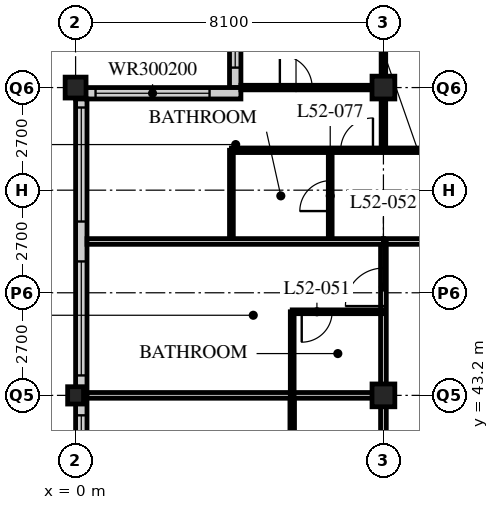
"""IFC4 building model, lengths in metres.
Left out: names, types, materials, properties, quantities, classifications, styles, units other than length and angle.
Written with IfcOpenShell. Run it as: python <this file> out.ifc"""

import sys

from ifc_helpers import new_model, si_unit, direction, frame, frame_2d, origin, origin_2d, place, context, subcontext, project, spatial, rectangle, hollow_rectangle, i_section, extrude, element, fill, save


model = new_model("IFC4")
c1 = context("Model", 3, precision=1e-05, world=origin(), true_north=direction((0.0, 1.0)))
c2 = subcontext(c1, "Body", "Model", "MODEL_VIEW")
j1 = project(units=[si_unit("LENGTHUNIT", "METRE"), si_unit("PLANEANGLEUNIT", "RADIAN")], contexts=[c1])
p1 = place(None, origin())
s1 = spatial("IfcSite", under=j1, at=p1, CompositionType="ELEMENT")
p2 = place(p1, origin())
s2 = spatial("IfcBuilding", under=s1, at=p2, CompositionType="ELEMENT")
p3 = place(p2, frame((0.0, 0.0, 202.8)))
s3 = spatial("IfcBuildingStorey", under=s2, at=p3, CompositionType="ELEMENT", Elevation=202.8)
p4 = place(p3, frame((0.0, 43.2, 0.0), z_axis=(0.0, 0.0, 1.0), x_axis=(1.0, 0.0, 0.0)))
e1 = element("IfcColumn", 1, at=p4, inside=s3, PredefinedType="COLUMN", context=c2, shape_type="SweptSolid", body=[
    extrude(i_section(OverallWidth=0.418, OverallDepth=0.456, WebThickness=0.042, FlangeThickness=0.067, FilletRadius=0.015, at=origin_2d()), origin(), (0.0, 0.0, 1.0), 3.6),
])
p5 = place(p3, frame((0.0, 51.3, 0.0), z_axis=(0.0, 0.0, 1.0), x_axis=(1.0, 0.0, 0.0)))
e2 = element("IfcColumn", 2, at=p5, inside=s3, PredefinedType="COLUMN", context=c2, shape_type="SweptSolid", body=[
    extrude(hollow_rectangle(XDim=0.55, YDim=0.55, WallThickness=0.045, at=origin_2d()), origin(), (0.0, 0.0, 1.0), 3.6),
])
for number, where, z_axis, x_axis in (
    (3, (8.1, 43.2, 0.0), (0.0, 0.0, 1.0), (1.0, 0.0, 0.0)),
    (4, (8.1, 51.3, 0.0), (0.0, 0.0, 1.0), (1.0, 0.0, 0.0)),
):
    element("IfcColumn", number, at=place(p3, frame(where, z_axis=z_axis, x_axis=x_axis)), inside=s3, PredefinedType="COLUMN", context=c2, shape_type="SweptSolid", body=[
        extrude(hollow_rectangle(XDim=0.6, YDim=0.6, WallThickness=0.05, at=origin_2d()), origin(), (0.0, 0.0, 1.0), 3.6),
    ])
p6 = place(p3, frame((4.2, 55.05, 0.0), z_axis=(0.0, 0.0, 1.0), x_axis=(0.0, -1.0, 0.0)))
e5 = element("IfcWall", 5, at=p6, inside=s3, PredefinedType="SOLIDWALL", context=c2, shape_type="SweptSolid", body=[
    extrude(rectangle(XDim=3.75, YDim=0.3, at=frame_2d((1.875, 0.0))), origin(), (0.0, 0.0, 1.0), 3.39),
])
p7 = place(p6, frame((0.225, 0.0, 0.6)))
e6 = element("IfcOpeningElement", 6, at=p7, cuts=e5, PredefinedType="OPENING", context=c2, shape_type="SweptSolid", body=[
    extrude(rectangle(XDim=3.0, YDim=2.0, at=frame_2d((1.5, 1.0))), frame((0.0, 0.16, 0.0), z_axis=(0.0, -1.0, 0.0), x_axis=(1.0, 0.0, 0.0)), (0.0, 0.0, 1.0), 0.32),
])
p8 = place(p3, frame((4.35, 51.15, 0.0), z_axis=(0.0, 0.0, 1.0), x_axis=(-1.0, 0.0, 0.0)))
e7 = element("IfcWall", 7, at=p8, inside=s3, PredefinedType="SOLIDWALL", context=c2, shape_type="SweptSolid", body=[
    extrude(rectangle(XDim=4.35, YDim=0.3, at=frame_2d((2.175, 0.0))), origin(), (0.0, 0.0, 1.0), 3.39),
])
p9 = place(p8, frame((0.825, 0.0, 0.6)))
e8 = element("IfcOpeningElement", 8, at=p9, cuts=e7, PredefinedType="OPENING", context=c2, shape_type="SweptSolid", body=[
    extrude(rectangle(XDim=3.0, YDim=2.0, at=frame_2d((1.5, 1.0))), frame((0.0, 0.16, 0.0), z_axis=(0.0, -1.0, 0.0), x_axis=(1.0, 0.0, 0.0)), (0.0, 0.0, 1.0), 0.32),
])
p10 = place(p3, frame((0.15, 51.0, 0.0), z_axis=(0.0, 0.0, 1.0), x_axis=(0.0, -1.0, 0.0)))
e9 = element("IfcWall", 9, at=p10, inside=s3, PredefinedType="SOLIDWALL", context=c2, shape_type="SweptSolid", body=[
    extrude(rectangle(XDim=32.1, YDim=0.3, at=frame_2d((16.05, 0.0))), origin(), (0.0, 0.0, 1.0), 3.39),
])
p11 = place(p10, frame((0.225, 0.0, 0.6)))
e10 = element("IfcOpeningElement", 10, at=p11, cuts=e9, PredefinedType="OPENING", context=c2, shape_type="SweptSolid", body=[
    extrude(rectangle(XDim=3.0, YDim=2.4, at=frame_2d((1.5, 1.2))), frame((0.0, 0.16, 0.0), z_axis=(0.0, -1.0, 0.0), x_axis=(1.0, 0.0, 0.0)), (0.0, 0.0, 1.0), 0.32),
])
p12 = place(p10, frame((4.275, 0.0, 0.6)))
e11 = element("IfcOpeningElement", 11, at=p12, cuts=e9, PredefinedType="OPENING", context=c2, shape_type="SweptSolid", body=[
    extrude(rectangle(XDim=3.0, YDim=2.4, at=frame_2d((1.5, 1.2))), frame((0.0, 0.16, 0.0), z_axis=(0.0, -1.0, 0.0), x_axis=(1.0, 0.0, 0.0)), (0.0, 0.0, 1.0), 0.32),
])
p13 = place(p10, frame((8.325, 0.0, 0.6)))
e12 = element("IfcOpeningElement", 12, at=p13, cuts=e9, PredefinedType="OPENING", context=c2, shape_type="SweptSolid", body=[
    extrude(rectangle(XDim=3.0, YDim=2.4, at=frame_2d((1.5, 1.2))), frame((0.0, 0.16, 0.0), z_axis=(0.0, -1.0, 0.0), x_axis=(1.0, 0.0, 0.0)), (0.0, 0.0, 1.0), 0.32),
])
p14 = place(p10, frame((12.375, 0.0, 0.6)))
e13 = element("IfcOpeningElement", 13, at=p14, cuts=e9, PredefinedType="OPENING", context=c2, shape_type="SweptSolid", body=[
    extrude(rectangle(XDim=3.0, YDim=2.4, at=frame_2d((1.5, 1.2))), frame((0.0, 0.16, 0.0), z_axis=(0.0, -1.0, 0.0), x_axis=(1.0, 0.0, 0.0)), (0.0, 0.0, 1.0), 0.32),
])
p15 = place(p10, frame((16.425, 0.0, 0.6)))
e14 = element("IfcOpeningElement", 14, at=p15, cuts=e9, PredefinedType="OPENING", context=c2, shape_type="SweptSolid", body=[
    extrude(rectangle(XDim=3.0, YDim=2.4, at=frame_2d((1.5, 1.2))), frame((0.0, 0.16, 0.0), z_axis=(0.0, -1.0, 0.0), x_axis=(1.0, 0.0, 0.0)), (0.0, 0.0, 1.0), 0.32),
])
p16 = place(p10, frame((20.475, 0.0, 0.6)))
e15 = element("IfcOpeningElement", 15, at=p16, cuts=e9, PredefinedType="OPENING", context=c2, shape_type="SweptSolid", body=[
    extrude(rectangle(XDim=3.0, YDim=2.4, at=frame_2d((1.5, 1.2))), frame((0.0, 0.16, 0.0), z_axis=(0.0, -1.0, 0.0), x_axis=(1.0, 0.0, 0.0)), (0.0, 0.0, 1.0), 0.32),
])
p17 = place(p10, frame((24.525, 0.0, 0.6)))
e16 = element("IfcOpeningElement", 16, at=p17, cuts=e9, PredefinedType="OPENING", context=c2, shape_type="SweptSolid", body=[
    extrude(rectangle(XDim=3.0, YDim=2.4, at=frame_2d((1.5, 1.2))), frame((0.0, 0.16, 0.0), z_axis=(0.0, -1.0, 0.0), x_axis=(1.0, 0.0, 0.0)), (0.0, 0.0, 1.0), 0.32),
])
p18 = place(p10, frame((28.575, 0.0, 0.6)))
e17 = element("IfcOpeningElement", 17, at=p18, cuts=e9, PredefinedType="OPENING", context=c2, shape_type="SweptSolid", body=[
    extrude(rectangle(XDim=3.0, YDim=2.4, at=frame_2d((1.5, 1.2))), frame((0.0, 0.16, 0.0), z_axis=(0.0, -1.0, 0.0), x_axis=(1.0, 0.0, 0.0)), (0.0, 0.0, 1.0), 0.32),
])
p19 = place(p3, frame((8.1, 47.25, 0.0), z_axis=(0.0, 0.0, 1.0), x_axis=(1.0, 0.0, 0.0)))
e18 = element("IfcWall", 18, at=p19, inside=s3, PredefinedType="PARTITIONING", context=c2, shape_type="SweptSolid", body=[
    extrude(rectangle(XDim=36.45, YDim=0.15, at=frame_2d((18.225, 0.0))), origin(), (0.0, 0.0, 1.0), 3.39),
])
p20 = place(p19, frame((4.45, 0.0, 0.0)))
e19 = element("IfcOpeningElement", 19, at=p20, cuts=e18, PredefinedType="OPENING", context=c2, shape_type="SweptSolid", body=[
    extrude(rectangle(XDim=1.0, YDim=2.1, at=frame_2d((0.5, 1.05))), frame((0.0, 0.085, 0.0), z_axis=(0.0, -1.0, 0.0), x_axis=(1.0, 0.0, 0.0)), (0.0, 0.0, 1.0), 0.17),
])
p21 = place(p19, frame((12.55, 0.0, 0.0)))
e20 = element("IfcOpeningElement", 20, at=p21, cuts=e18, PredefinedType="OPENING", context=c2, shape_type="SweptSolid", body=[
    extrude(rectangle(XDim=1.0, YDim=2.1, at=frame_2d((0.5, 1.05))), frame((0.0, 0.085, 0.0), z_axis=(0.0, -1.0, 0.0), x_axis=(1.0, 0.0, 0.0)), (0.0, 0.0, 1.0), 0.17),
])
p22 = place(p19, frame((30.7, 0.0, 0.0)))
e21 = element("IfcOpeningElement", 21, at=p22, cuts=e18, PredefinedType="OPENING", context=c2, shape_type="SweptSolid", body=[
    extrude(rectangle(XDim=1.0, YDim=2.1, at=frame_2d((0.5, 1.05))), frame((0.0, 0.085, 0.0), z_axis=(0.0, -1.0, 0.0), x_axis=(1.0, 0.0, 0.0)), (0.0, 0.0, 1.0), 0.17),
])
p23 = place(p19, frame((33.925, 0.0, 0.0)))
e22 = element("IfcOpeningElement", 22, at=p23, cuts=e18, PredefinedType="OPENING", context=c2, shape_type="SweptSolid", body=[
    extrude(rectangle(XDim=1.0, YDim=2.1, at=frame_2d((0.5, 1.05))), frame((0.0, 0.085, 0.0), z_axis=(0.0, -1.0, 0.0), x_axis=(1.0, 0.0, 0.0)), (0.0, 0.0, 1.0), 0.17),
])
p24 = place(p19, frame((1.525, 0.0, 0.0)))
e23 = element("IfcOpeningElement", 23, at=p24, cuts=e18, PredefinedType="OPENING", context=c2, shape_type="SweptSolid", body=[
    extrude(rectangle(XDim=1.0, YDim=2.1, at=frame_2d((0.5, 1.05))), frame((0.0, 0.085, 0.0), z_axis=(0.0, -1.0, 0.0), x_axis=(1.0, 0.0, 0.0)), (0.0, 0.0, 1.0), 0.17),
])
p25 = place(p3, frame((8.1, 18.9, 0.0), z_axis=(0.0, 0.0, 1.0), x_axis=(0.0, 1.0, 0.0)))
e24 = element("IfcWall", 24, at=p25, inside=s3, PredefinedType="PARTITIONING", context=c2, shape_type="SweptSolid", body=[
    extrude(rectangle(XDim=28.35, YDim=0.15, at=frame_2d((14.175, 0.0))), origin(), (0.0, 0.0, 1.0), 2.778),
])
p26 = place(p25, frame((0.9, 0.0, 0.0)))
e25 = element("IfcOpeningElement", 25, at=p26, cuts=e24, PredefinedType="OPENING", context=c2, shape_type="SweptSolid", body=[
    extrude(rectangle(XDim=1.0, YDim=2.1, at=frame_2d((0.5, 1.05))), frame((0.0, 0.085, 0.0), z_axis=(0.0, -1.0, 0.0), x_axis=(1.0, 0.0, 0.0)), (0.0, 0.0, 1.0), 0.17),
])
p27 = place(p25, frame((17.1, 0.0, 0.0)))
e26 = element("IfcOpeningElement", 26, at=p27, cuts=e24, PredefinedType="OPENING", context=c2, shape_type="SweptSolid", body=[
    extrude(rectangle(XDim=1.0, YDim=2.1, at=frame_2d((0.5, 1.05))), frame((0.0, 0.085, 0.0), z_axis=(0.0, -1.0, 0.0), x_axis=(1.0, 0.0, 0.0)), (0.0, 0.0, 1.0), 0.17),
])
p28 = place(p25, frame((26.65, 0.0, 0.0)))
e27 = element("IfcOpeningElement", 27, at=p28, cuts=e24, PredefinedType="OPENING", context=c2, shape_type="SweptSolid", body=[
    extrude(rectangle(XDim=1.0, YDim=2.1, at=frame_2d((0.5, 1.05))), frame((0.0, 0.085, 0.0), z_axis=(0.0, -1.0, 0.0), x_axis=(1.0, 0.0, 0.0)), (0.0, 0.0, 1.0), 0.17),
])
p29 = place(p3, frame((5.7, 18.9, 0.0), z_axis=(0.0, 0.0, 1.0), x_axis=(0.0, 1.0, 0.0)))
e28 = element("IfcWall", 28, at=p29, inside=s3, PredefinedType="PARTITIONING", context=c2, shape_type="SweptSolid", body=[
    extrude(rectangle(XDim=24.3, YDim=0.12, at=frame_2d((12.15, 0.0))), origin(), (0.0, 0.0, 1.0), 3.39),
])
p30 = place(p29, frame((0.975, 0.0, 0.0)))
e29 = element("IfcOpeningElement", 29, at=p30, cuts=e28, PredefinedType="OPENING", context=c2, shape_type="SweptSolid", body=[
    extrude(rectangle(XDim=0.85, YDim=2.1, at=frame_2d((0.425, 1.05))), frame((0.0, 0.07, 0.0), z_axis=(0.0, -1.0, 0.0), x_axis=(1.0, 0.0, 0.0)), (0.0, 0.0, 1.0), 0.14),
])
p31 = place(p29, frame((8.425, 0.0, 0.0)))
e30 = element("IfcOpeningElement", 30, at=p31, cuts=e28, PredefinedType="OPENING", context=c2, shape_type="SweptSolid", body=[
    extrude(rectangle(XDim=0.85, YDim=2.1, at=frame_2d((0.425, 1.05))), frame((0.0, 0.07, 0.0), z_axis=(0.0, -1.0, 0.0), x_axis=(1.0, 0.0, 0.0)), (0.0, 0.0, 1.0), 0.14),
])
p32 = place(p29, frame((12.475, 0.0, 0.0)))
e31 = element("IfcOpeningElement", 31, at=p32, cuts=e28, PredefinedType="OPENING", context=c2, shape_type="SweptSolid", body=[
    extrude(rectangle(XDim=0.85, YDim=2.1, at=frame_2d((0.425, 1.05))), frame((0.0, 0.07, 0.0), z_axis=(0.0, -1.0, 0.0), x_axis=(1.0, 0.0, 0.0)), (0.0, 0.0, 1.0), 0.14),
])
p33 = place(p29, frame((17.175, 0.0, 0.0)))
e32 = element("IfcOpeningElement", 32, at=p33, cuts=e28, PredefinedType="OPENING", context=c2, shape_type="SweptSolid", body=[
    extrude(rectangle(XDim=0.85, YDim=2.1, at=frame_2d((0.425, 1.05))), frame((0.0, 0.07, 0.0), z_axis=(0.0, -1.0, 0.0), x_axis=(1.0, 0.0, 0.0)), (0.0, 0.0, 1.0), 0.14),
])
p34 = place(p29, frame((20.575, 0.0, 0.0)))
e33 = element("IfcOpeningElement", 33, at=p34, cuts=e28, PredefinedType="OPENING", context=c2, shape_type="SweptSolid", body=[
    extrude(rectangle(XDim=0.85, YDim=2.1, at=frame_2d((0.425, 1.05))), frame((0.0, 0.07, 0.0), z_axis=(0.0, -1.0, 0.0), x_axis=(1.0, 0.0, 0.0)), (0.0, 0.0, 1.0), 0.14),
])
p35 = place(p3, frame((8.1, 43.2, 0.0), z_axis=(0.0, 0.0, 1.0), x_axis=(-1.0, 0.0, 0.0)))
e34 = element("IfcWall", 34, at=p35, inside=s3, PredefinedType="PARTITIONING", context=c2, shape_type="SweptSolid", body=[
    extrude(rectangle(XDim=7.8, YDim=0.15, at=frame_2d((3.9, 0.0))), origin(), (0.0, 0.0, 1.0), 2.778),
])
p36 = place(p3, frame((5.7, 43.2, 0.0), z_axis=(0.0, 0.0, 1.0), x_axis=(0.0, 1.0, 0.0)))
e35 = element("IfcWall", 35, at=p36, inside=s3, PredefinedType="PARTITIONING", context=c2, shape_type="SweptSolid", body=[
    extrude(rectangle(XDim=2.2, YDim=0.1, at=frame_2d((1.1, 0.0))), origin(), (0.0, 0.0, 1.0), 3.39),
])
p37 = place(p3, frame((8.1, 45.4, 0.0), z_axis=(0.0, 0.0, 1.0), x_axis=(-1.0, 0.0, 0.0)))
e36 = element("IfcWall", 36, at=p37, inside=s3, PredefinedType="PARTITIONING", context=c2, shape_type="SweptSolid", body=[
    extrude(rectangle(XDim=2.4, YDim=0.1, at=frame_2d((1.2, 0.0))), origin(), (0.0, 0.0, 1.0), 3.39),
])
p38 = place(p37, frame((1.35, 0.0, 0.0)))
e37 = element("IfcOpeningElement", 37, at=p38, cuts=e36, PredefinedType="OPENING", context=c2, shape_type="SweptSolid", body=[
    extrude(rectangle(XDim=0.8, YDim=2.1, at=frame_2d((0.4, 1.05))), frame((0.0, 0.06, 0.0), z_axis=(0.0, -1.0, 0.0), x_axis=(1.0, 0.0, 0.0)), (0.0, 0.0, 1.0), 0.12),
])
p39 = place(p3, frame((6.7, 47.25, 0.0), z_axis=(0.0, 0.0, 1.0), x_axis=(0.0, 1.0, 0.0)))
e38 = element("IfcWall", 38, at=p39, inside=s3, PredefinedType="PARTITIONING", context=c2, shape_type="SweptSolid", body=[
    extrude(rectangle(XDim=2.4, YDim=0.1, at=frame_2d((1.2, 0.0))), origin(), (0.0, 0.0, 1.0), 3.39),
])
p40 = place(p39, frame((0.8, 0.0, 0.0)))
e39 = element("IfcOpeningElement", 39, at=p40, cuts=e38, PredefinedType="OPENING", context=c2, shape_type="SweptSolid", body=[
    extrude(rectangle(XDim=0.8, YDim=2.1, at=frame_2d((0.4, 1.05))), frame((0.0, 0.06, 0.0), z_axis=(0.0, -1.0, 0.0), x_axis=(1.0, 0.0, 0.0)), (0.0, 0.0, 1.0), 0.12),
])
p41 = place(p3, frame((4.1, 47.25, 0.0), z_axis=(0.0, 0.0, 1.0), x_axis=(0.0, 1.0, 0.0)))
e40 = element("IfcWall", 40, at=p41, inside=s3, PredefinedType="PARTITIONING", context=c2, shape_type="SweptSolid", body=[
    extrude(rectangle(XDim=2.4, YDim=0.1, at=frame_2d((1.2, 0.0))), origin(), (0.0, 0.0, 1.0), 3.39),
])
p42 = place(p3, frame((4.1, 49.65, 0.0), z_axis=(0.0, 0.0, 1.0), x_axis=(1.0, 0.0, 0.0)))
e41 = element("IfcWall", 41, at=p42, inside=s3, PredefinedType="PARTITIONING", context=c2, shape_type="SweptSolid", body=[
    extrude(rectangle(XDim=32.35, YDim=0.12, at=frame_2d((16.175, 0.0))), origin(), (0.0, 0.0, 1.0), 3.39),
])
p43 = place(p42, frame((9.025, 0.0, 0.0)))
e42 = element("IfcOpeningElement", 42, at=p43, cuts=e41, PredefinedType="OPENING", context=c2, shape_type="SweptSolid", body=[
    extrude(rectangle(XDim=0.85, YDim=2.1, at=frame_2d((0.425, 1.05))), frame((0.0, 0.07, 0.0), z_axis=(0.0, -1.0, 0.0), x_axis=(1.0, 0.0, 0.0)), (0.0, 0.0, 1.0), 0.14),
])
p44 = place(p42, frame((12.425, 0.0, 0.0)))
e43 = element("IfcOpeningElement", 43, at=p44, cuts=e41, PredefinedType="OPENING", context=c2, shape_type="SweptSolid", body=[
    extrude(rectangle(XDim=0.85, YDim=2.1, at=frame_2d((0.425, 1.05))), frame((0.0, 0.07, 0.0), z_axis=(0.0, -1.0, 0.0), x_axis=(1.0, 0.0, 0.0)), (0.0, 0.0, 1.0), 0.14),
])
p45 = place(p42, frame((17.125, 0.0, 0.0)))
e44 = element("IfcOpeningElement", 44, at=p45, cuts=e41, PredefinedType="OPENING", context=c2, shape_type="SweptSolid", body=[
    extrude(rectangle(XDim=0.85, YDim=2.1, at=frame_2d((0.425, 1.05))), frame((0.0, 0.07, 0.0), z_axis=(0.0, -1.0, 0.0), x_axis=(1.0, 0.0, 0.0)), (0.0, 0.0, 1.0), 0.14),
])
p46 = place(p42, frame((24.575, 0.0, 0.0)))
e45 = element("IfcOpeningElement", 45, at=p46, cuts=e41, PredefinedType="OPENING", context=c2, shape_type="SweptSolid", body=[
    extrude(rectangle(XDim=0.85, YDim=2.1, at=frame_2d((0.425, 1.05))), frame((0.0, 0.07, 0.0), z_axis=(0.0, -1.0, 0.0), x_axis=(1.0, 0.0, 0.0)), (0.0, 0.0, 1.0), 0.14),
])
p47 = place(p42, frame((28.625, 0.0, 0.0)))
e46 = element("IfcOpeningElement", 46, at=p47, cuts=e41, PredefinedType="OPENING", context=c2, shape_type="SweptSolid", body=[
    extrude(rectangle(XDim=0.85, YDim=2.1, at=frame_2d((0.425, 1.05))), frame((0.0, 0.07, 0.0), z_axis=(0.0, -1.0, 0.0), x_axis=(1.0, 0.0, 0.0)), (0.0, 0.0, 1.0), 0.14),
])
p48 = place(p42, frame((6.725, 0.0, 0.0)))
e47 = element("IfcOpeningElement", 47, at=p48, cuts=e41, PredefinedType="OPENING", context=c2, shape_type="SweptSolid", body=[
    extrude(rectangle(XDim=0.85, YDim=2.1, at=frame_2d((0.425, 1.05))), frame((0.0, 0.07, 0.0), z_axis=(0.0, -1.0, 0.0), x_axis=(1.0, 0.0, 0.0)), (0.0, 0.0, 1.0), 0.14),
])
p49 = place(p42, frame((2.875, 0.0, 0.0)))
e48 = element("IfcOpeningElement", 48, at=p49, cuts=e41, PredefinedType="OPENING", context=c2, shape_type="SweptSolid", body=[
    extrude(rectangle(XDim=0.85, YDim=2.1, at=frame_2d((0.425, 1.05))), frame((0.0, 0.07, 0.0), z_axis=(0.0, -1.0, 0.0), x_axis=(1.0, 0.0, 0.0)), (0.0, 0.0, 1.0), 0.14),
])
p50 = place(p3, frame((8.1, 49.65, 0.0), z_axis=(0.0, 0.0, 1.0), x_axis=(0.0, 1.0, 0.0)))
e49 = element("IfcWall", 49, at=p50, inside=s3, PredefinedType="PARTITIONING", context=c2, shape_type="SweptSolid", body=[
    extrude(rectangle(XDim=5.4, YDim=0.12, at=frame_2d((2.7, 0.0))), origin(), (0.0, 0.0, 1.0), 2.778),
])
p51 = place(p3, frame((8.1, 51.3, 0.0), z_axis=(0.0, 0.0, 1.0), x_axis=(-1.0, 0.0, 0.0)))
e50 = element("IfcWall", 50, at=p51, inside=s3, PredefinedType="PARTITIONING", context=c2, shape_type="SweptSolid", body=[
    extrude(rectangle(XDim=3.75, YDim=0.12, at=frame_2d((1.875, 0.0))), origin(), (0.0, 0.0, 1.0), 2.778),
])
p52 = place(p51, frame((1.875, 0.0, 0.0)))
e51 = element("IfcOpeningElement", 51, at=p52, cuts=e50, PredefinedType="OPENING", context=c2, shape_type="SweptSolid", body=[
    extrude(rectangle(XDim=0.85, YDim=2.1, at=frame_2d((0.425, 1.05))), frame((0.0, 0.07, 0.0), z_axis=(0.0, -1.0, 0.0), x_axis=(1.0, 0.0, 0.0)), (0.0, 0.0, 1.0), 0.14),
])
p53 = place(p3, frame((0.3, 47.25, 0.0), z_axis=(0.0, 0.0, 1.0), x_axis=(1.0, 0.0, 0.0)))
e52 = element("IfcWall", 52, at=p53, inside=s3, PredefinedType="PARTITIONING", context=c2, shape_type="SweptSolid", body=[
    extrude(rectangle(XDim=7.8, YDim=0.15, at=frame_2d((3.9, 0.0))), origin(), (0.0, 0.0, 1.0), 3.39),
])
p54 = place(p7, origin())
e53 = element("IfcWindow", 53, at=p54, inside=s3, PartitioningType="SINGLE_PANEL", PredefinedType="WINDOW", context=c2, shape_type="SweptSolid", body=[
    extrude(rectangle(XDim=3.0, YDim=2.0, at=frame_2d((1.5, 1.0))), frame((0.0, 0.03, 0.0), z_axis=(0.0, -1.0, 0.0), x_axis=(1.0, 0.0, 0.0)), (0.0, 0.0, 1.0), 0.06),
])
fill(e6, e53)
p55 = place(p9, origin())
e54 = element("IfcWindow", 54, at=p55, inside=s3, PartitioningType="SINGLE_PANEL", PredefinedType="WINDOW", context=c2, shape_type="SweptSolid", body=[
    extrude(rectangle(XDim=3.0, YDim=2.0, at=frame_2d((1.5, 1.0))), frame((0.0, 0.03, 0.0), z_axis=(0.0, -1.0, 0.0), x_axis=(1.0, 0.0, 0.0)), (0.0, 0.0, 1.0), 0.06),
])
fill(e8, e54)
p56 = place(p11, origin())
e55 = element("IfcWindow", 55, at=p56, inside=s3, PartitioningType="SINGLE_PANEL", PredefinedType="WINDOW", context=c2, shape_type="SweptSolid", body=[
    extrude(rectangle(XDim=3.0, YDim=2.4, at=frame_2d((1.5, 1.2))), frame((0.0, 0.03, 0.0), z_axis=(0.0, -1.0, 0.0), x_axis=(1.0, 0.0, 0.0)), (0.0, 0.0, 1.0), 0.06),
])
fill(e10, e55)
p57 = place(p12, origin())
e56 = element("IfcWindow", 56, at=p57, inside=s3, PartitioningType="SINGLE_PANEL", PredefinedType="WINDOW", context=c2, shape_type="SweptSolid", body=[
    extrude(rectangle(XDim=3.0, YDim=2.4, at=frame_2d((1.5, 1.2))), frame((0.0, 0.03, 0.0), z_axis=(0.0, -1.0, 0.0), x_axis=(1.0, 0.0, 0.0)), (0.0, 0.0, 1.0), 0.06),
])
fill(e11, e56)
p58 = place(p13, origin())
e57 = element("IfcWindow", 57, at=p58, inside=s3, PartitioningType="SINGLE_PANEL", PredefinedType="WINDOW", context=c2, shape_type="SweptSolid", body=[
    extrude(rectangle(XDim=3.0, YDim=2.4, at=frame_2d((1.5, 1.2))), frame((0.0, 0.03, 0.0), z_axis=(0.0, -1.0, 0.0), x_axis=(1.0, 0.0, 0.0)), (0.0, 0.0, 1.0), 0.06),
])
fill(e12, e57)
p59 = place(p38, origin())
e58 = element("IfcDoor", 58, at=p59, inside=s3, OperationType="SINGLE_SWING_RIGHT", PredefinedType="DOOR", context=c2, shape_type="SweptSolid", body=[
    extrude(rectangle(XDim=0.8, YDim=2.1, at=frame_2d((0.4, 1.05))), frame((0.0, 0.025, 0.0), z_axis=(0.0, -1.0, 0.0), x_axis=(1.0, 0.0, 0.0)), (0.0, 0.0, 1.0), 0.05),
])
fill(e37, e58)
p60 = place(p28, origin())
e59 = element("IfcDoor", 59, at=p60, inside=s3, OperationType="SINGLE_SWING_LEFT", PredefinedType="DOOR", context=c2, shape_type="SweptSolid", body=[
    extrude(rectangle(XDim=1.0, YDim=2.1, at=frame_2d((0.5, 1.05))), frame((0.0, 0.025, 0.0), z_axis=(0.0, -1.0, 0.0), x_axis=(1.0, 0.0, 0.0)), (0.0, 0.0, 1.0), 0.05),
])
fill(e27, e59)
p61 = place(p40, origin())
e60 = element("IfcDoor", 60, at=p61, inside=s3, OperationType="SINGLE_SWING_LEFT", PredefinedType="DOOR", context=c2, shape_type="SweptSolid", body=[
    extrude(rectangle(XDim=0.8, YDim=2.1, at=frame_2d((0.4, 1.05))), frame((0.0, 0.025, 0.0), z_axis=(0.0, -1.0, 0.0), x_axis=(1.0, 0.0, 0.0)), (0.0, 0.0, 1.0), 0.05),
])
fill(e39, e60)
p62 = place(p49, origin())
e61 = element("IfcDoor", 61, at=p62, inside=s3, OperationType="SINGLE_SWING_RIGHT", PredefinedType="DOOR", context=c2, shape_type="SweptSolid", body=[
    extrude(rectangle(XDim=0.85, YDim=2.1, at=frame_2d((0.425, 1.05))), frame((0.0, 0.025, 0.0), z_axis=(0.0, -1.0, 0.0), x_axis=(1.0, 0.0, 0.0)), (0.0, 0.0, 1.0), 0.05),
])
fill(e48, e61)
p63 = place(p52, origin())
e62 = element("IfcDoor", 62, at=p63, inside=s3, OperationType="SINGLE_SWING_LEFT", PredefinedType="DOOR", context=c2, shape_type="SweptSolid", body=[
    extrude(rectangle(XDim=0.85, YDim=2.1, at=frame_2d((0.425, 1.05))), frame((0.0, 0.025, 0.0), z_axis=(0.0, -1.0, 0.0), x_axis=(1.0, 0.0, 0.0)), (0.0, 0.0, 1.0), 0.05),
])
fill(e51, e62)
save(model, sys.argv[1])
